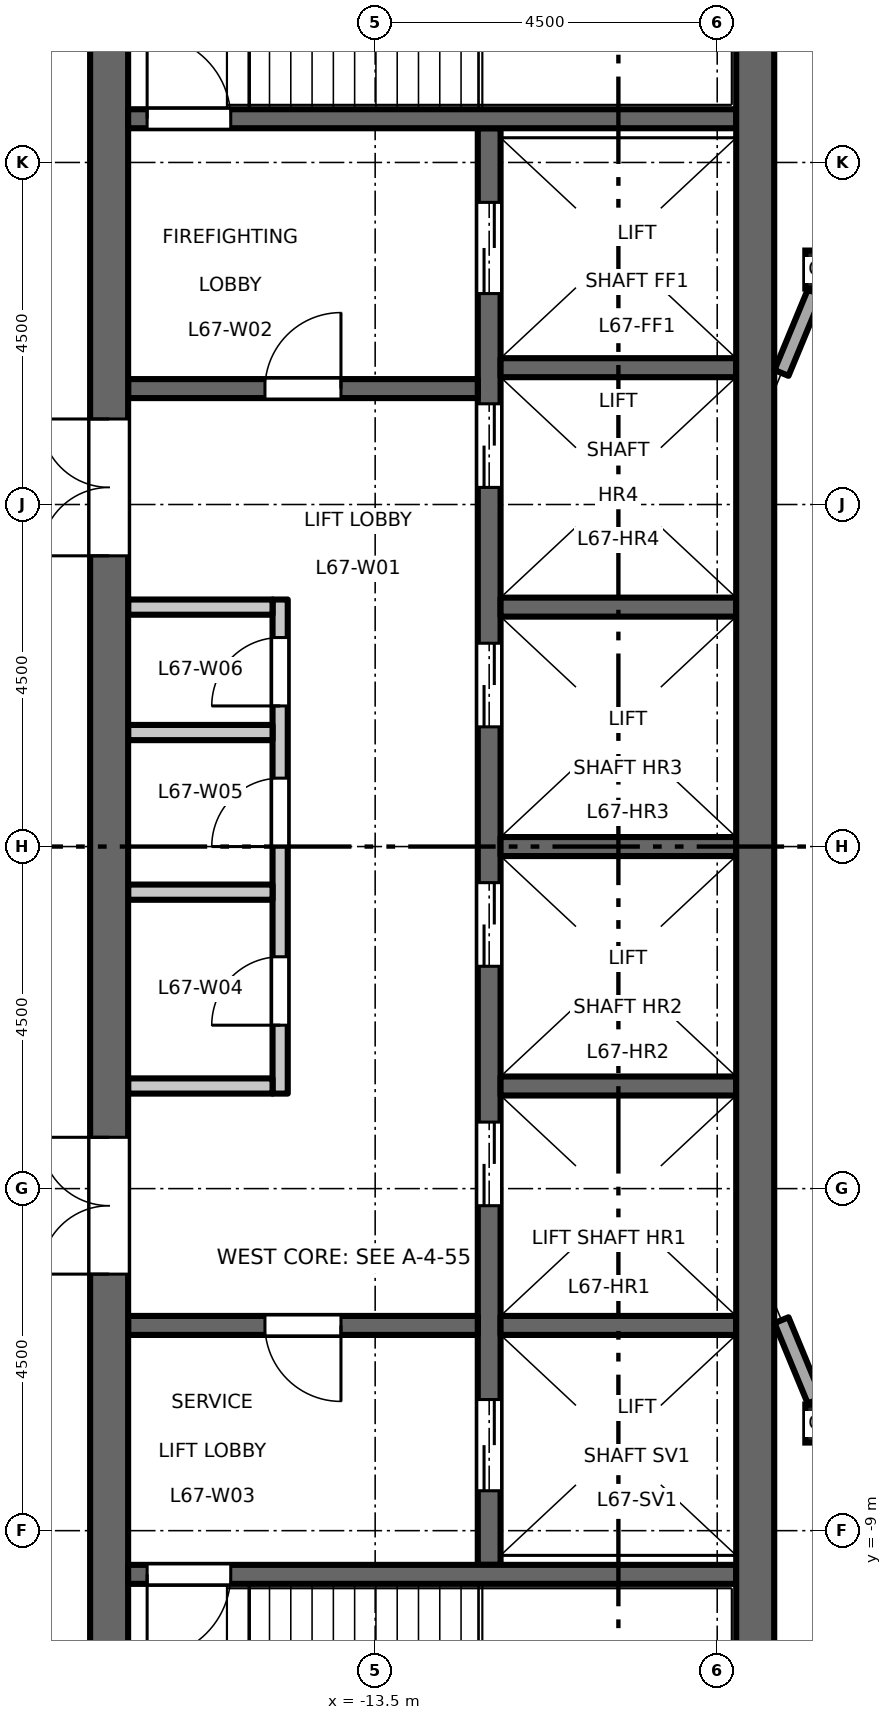
"""IFC4 building model, lengths in metres.
Left out: names, types, materials, properties, quantities, classifications, styles, units other than length and angle.
Written with IfcOpenShell. Run it as: python <this file> out.ifc"""

import sys

from ifc_helpers import new_model, si_unit, direction, frame, frame_2d, origin, origin_2d, place, context, subcontext, project, spatial, rectangle, hollow_rectangle, extrude, element, fill, save


model = new_model("IFC4")
c1 = context("Model", 3, precision=1e-05, world=origin(), true_north=direction((0.0, 1.0)))
c2 = subcontext(c1, "Body", "Model", "MODEL_VIEW")
j1 = project(units=[si_unit("LENGTHUNIT", "METRE"), si_unit("PLANEANGLEUNIT", "RADIAN")], contexts=[c1])
p1 = place(None, origin())
s1 = spatial("IfcSite", under=j1, at=p1, CompositionType="ELEMENT")
p2 = place(p1, origin())
s2 = spatial("IfcBuilding", under=s1, at=p2, CompositionType="ELEMENT")
p3 = place(p2, frame((0.0, 0.0, 312.2)))
s3 = spatial("IfcBuildingStorey", under=s2, at=p3, CompositionType="ELEMENT", Elevation=312.2)
for number, where, z_axis, x_axis in (
    (1, (-7.591, -7.591, 0.0), (0.0, 0.0, 1.0), (1.0, 0.0, 0.0)),
    (2, (-7.591, 7.591, 0.0), (0.0, 0.0, 1.0), (1.0, 0.0, 0.0)),
):
    element("IfcColumn", number, at=place(p3, frame(where, z_axis=z_axis, x_axis=x_axis)), inside=s3, PredefinedType="COLUMN", context=c2, shape_type="SweptSolid", body=[
        extrude(hollow_rectangle(XDim=0.5, YDim=0.5, WallThickness=0.025, at=origin_2d()), origin(), (0.0, 0.0, 1.0), 4.5),
    ])
p4 = place(p3, frame((-14.75, -3.25, 0.0), z_axis=(0.0, 0.0, 1.0), x_axis=(0.0, 1.0, 0.0)))
e3 = element("IfcWall", 3, at=p4, inside=s3, PredefinedType="PARTITIONING", context=c2, shape_type="SweptSolid", body=[
    extrude(rectangle(XDim=6.5, YDim=0.2, at=frame_2d((3.25, 0.0))), origin(), (0.0, 0.0, 1.0), 4.35),
])
p5 = place(p4, frame((0.9, 0.0, 0.0)))
e4 = element("IfcOpeningElement", 4, at=p5, cuts=e3, PredefinedType="OPENING", context=c2, shape_type="SweptSolid", body=[
    extrude(rectangle(XDim=0.9, YDim=2.1, at=frame_2d((0.45, 1.05))), frame((0.0, 0.11, 0.0), z_axis=(0.0, -1.0, 0.0), x_axis=(1.0, 0.0, 0.0)), (0.0, 0.0, 1.0), 0.22),
])
p6 = place(p4, frame((3.25, 0.0, 0.0)))
e5 = element("IfcOpeningElement", 5, at=p6, cuts=e3, PredefinedType="OPENING", context=c2, shape_type="SweptSolid", body=[
    extrude(rectangle(XDim=0.9, YDim=2.1, at=frame_2d((0.45, 1.05))), frame((0.0, 0.11, 0.0), z_axis=(0.0, -1.0, 0.0), x_axis=(1.0, 0.0, 0.0)), (0.0, 0.0, 1.0), 0.22),
])
p7 = place(p4, frame((5.1, 0.0, 0.0)))
e6 = element("IfcOpeningElement", 6, at=p7, cuts=e3, PredefinedType="OPENING", context=c2, shape_type="SweptSolid", body=[
    extrude(rectangle(XDim=0.9, YDim=2.1, at=frame_2d((0.45, 1.05))), frame((0.0, 0.11, 0.0), z_axis=(0.0, -1.0, 0.0), x_axis=(1.0, 0.0, 0.0)), (0.0, 0.0, 1.0), 0.22),
])
for number, where, z_axis, x_axis in (
    (7, (-14.85, 3.15, 0.0), (0.0, 0.0, 1.0), (-1.0, 0.0, 0.0)),
    (8, (-14.85, -3.15, 0.0), (0.0, 0.0, 1.0), (-1.0, 0.0, 0.0)),
    (9, (-14.85, -0.6, 0.0), (0.0, 0.0, 1.0), (-1.0, 0.0, 0.0)),
    (10, (-14.85, 1.5, 0.0), (0.0, 0.0, 1.0), (-1.0, 0.0, 0.0)),
):
    element("IfcWall", number, at=place(p3, frame(where, z_axis=z_axis, x_axis=x_axis)), inside=s3, PredefinedType="PARTITIONING", context=c2, shape_type="SweptSolid", body=[
        extrude(rectangle(XDim=1.9, YDim=0.2, at=frame_2d((0.95, 0.0))), origin(), (0.0, 0.0, 1.0), 4.35),
    ])
p8 = place(p3, frame((-12.0, -9.45, 0.0), z_axis=(0.0, 0.0, 1.0), x_axis=(0.0, 1.0, 0.0)))
e11 = element("IfcWall", 11, at=p8, inside=s3, PredefinedType="SHEAR", context=c2, shape_type="SweptSolid", body=[
    extrude(rectangle(XDim=18.9, YDim=0.3, at=frame_2d((9.45, 0.0))), origin(), (0.0, 0.0, 1.0), 4.35),
])
p9 = place(p8, frame((4.725, 0.0, 0.0)))
e12 = element("IfcOpeningElement", 12, at=p9, cuts=e11, PredefinedType="OPENING", context=c2, shape_type="SweptSolid", body=[
    extrude(rectangle(XDim=1.1, YDim=2.1, at=frame_2d((0.55, 1.05))), frame((0.0, 0.16, 0.0), z_axis=(0.0, -1.0, 0.0), x_axis=(1.0, 0.0, 0.0)), (0.0, 0.0, 1.0), 0.32),
])
p10 = place(p8, frame((7.875, 0.0, 0.0)))
e13 = element("IfcOpeningElement", 13, at=p10, cuts=e11, PredefinedType="OPENING", context=c2, shape_type="SweptSolid", body=[
    extrude(rectangle(XDim=1.1, YDim=2.1, at=frame_2d((0.55, 1.05))), frame((0.0, 0.16, 0.0), z_axis=(0.0, -1.0, 0.0), x_axis=(1.0, 0.0, 0.0)), (0.0, 0.0, 1.0), 0.32),
])
p11 = place(p8, frame((11.025, 0.0, 0.0)))
e14 = element("IfcOpeningElement", 14, at=p11, cuts=e11, PredefinedType="OPENING", context=c2, shape_type="SweptSolid", body=[
    extrude(rectangle(XDim=1.1, YDim=2.1, at=frame_2d((0.55, 1.05))), frame((0.0, 0.16, 0.0), z_axis=(0.0, -1.0, 0.0), x_axis=(1.0, 0.0, 0.0)), (0.0, 0.0, 1.0), 0.32),
])
p12 = place(p8, frame((14.175, 0.0, 0.0)))
e15 = element("IfcOpeningElement", 15, at=p12, cuts=e11, PredefinedType="OPENING", context=c2, shape_type="SweptSolid", body=[
    extrude(rectangle(XDim=1.1, YDim=2.1, at=frame_2d((0.55, 1.05))), frame((0.0, 0.16, 0.0), z_axis=(0.0, -1.0, 0.0), x_axis=(1.0, 0.0, 0.0)), (0.0, 0.0, 1.0), 0.32),
])
p13 = place(p8, frame((16.725, 0.0, 0.0)))
e16 = element("IfcOpeningElement", 16, at=p13, cuts=e11, PredefinedType="OPENING", context=c2, shape_type="SweptSolid", body=[
    extrude(rectangle(XDim=1.2, YDim=2.1, at=frame_2d((0.6, 1.05))), frame((0.0, 0.16, 0.0), z_axis=(0.0, -1.0, 0.0), x_axis=(1.0, 0.0, 0.0)), (0.0, 0.0, 1.0), 0.32),
])
p14 = place(p8, frame((0.975, 0.0, 0.0)))
e17 = element("IfcOpeningElement", 17, at=p14, cuts=e11, PredefinedType="OPENING", context=c2, shape_type="SweptSolid", body=[
    extrude(rectangle(XDim=1.2, YDim=2.1, at=frame_2d((0.6, 1.05))), frame((0.0, 0.16, 0.0), z_axis=(0.0, -1.0, 0.0), x_axis=(1.0, 0.0, 0.0)), (0.0, 0.0, 1.0), 0.32),
])
p15 = place(p3, frame((-12.15, 6.025, 0.0), z_axis=(0.0, 0.0, 1.0), x_axis=(-1.0, 0.0, 0.0)))
e18 = element("IfcWall", 18, at=p15, inside=s3, PredefinedType="SHEAR", context=c2, shape_type="SweptSolid", body=[
    extrude(rectangle(XDim=4.6, YDim=0.25, at=frame_2d((2.3, 0.0))), origin(), (0.0, 0.0, 1.0), 4.35),
])
p16 = place(p15, frame((1.8, 0.0, 0.0)))
e19 = element("IfcOpeningElement", 19, at=p16, cuts=e18, PredefinedType="OPENING", context=c2, shape_type="SweptSolid", body=[
    extrude(rectangle(XDim=1.0, YDim=2.1, at=frame_2d((0.5, 1.05))), frame((0.0, 0.135, 0.0), z_axis=(0.0, -1.0, 0.0), x_axis=(1.0, 0.0, 0.0)), (0.0, 0.0, 1.0), 0.27),
])
p17 = place(p3, frame((-12.15, -6.3, 0.0), z_axis=(0.0, 0.0, 1.0), x_axis=(-1.0, 0.0, 0.0)))
e20 = element("IfcWall", 20, at=p17, inside=s3, PredefinedType="SHEAR", context=c2, shape_type="SweptSolid", body=[
    extrude(rectangle(XDim=4.6, YDim=0.25, at=frame_2d((2.3, 0.0))), origin(), (0.0, 0.0, 1.0), 4.35),
])
p18 = place(p17, frame((1.8, 0.0, 0.0)))
e21 = element("IfcOpeningElement", 21, at=p18, cuts=e20, PredefinedType="OPENING", context=c2, shape_type="SweptSolid", body=[
    extrude(rectangle(XDim=1.0, YDim=2.1, at=frame_2d((0.5, 1.05))), frame((0.0, 0.135, 0.0), z_axis=(0.0, -1.0, 0.0), x_axis=(1.0, 0.0, 0.0)), (0.0, 0.0, 1.0), 0.27),
])
p19 = place(p3, frame((-17.0, -13.0, 0.0), z_axis=(0.0, 0.0, 1.0), x_axis=(0.0, 1.0, 0.0)))
e22 = element("IfcWall", 22, at=p19, inside=s3, PredefinedType="SHEAR", context=c2, shape_type="SweptSolid", body=[
    extrude(rectangle(XDim=26.0, YDim=0.5, at=frame_2d((13.0, 0.0))), origin(), (0.0, 0.0, 1.0), 4.35),
])
p20 = place(p19, frame((16.825, 0.0, 0.0)))
e23 = element("IfcOpeningElement", 23, at=p20, cuts=e22, PredefinedType="OPENING", context=c2, shape_type="SweptSolid", body=[
    extrude(rectangle(XDim=1.8, YDim=2.1, at=frame_2d((0.9, 1.05))), frame((0.0, 0.26, 0.0), z_axis=(0.0, -1.0, 0.0), x_axis=(1.0, 0.0, 0.0)), (0.0, 0.0, 1.0), 0.52),
])
p21 = place(p19, frame((7.375, 0.0, 0.0)))
e24 = element("IfcOpeningElement", 24, at=p21, cuts=e22, PredefinedType="OPENING", context=c2, shape_type="SweptSolid", body=[
    extrude(rectangle(XDim=1.8, YDim=2.1, at=frame_2d((0.9, 1.05))), frame((0.0, 0.26, 0.0), z_axis=(0.0, -1.0, 0.0), x_axis=(1.0, 0.0, 0.0)), (0.0, 0.0, 1.0), 0.52),
])
for number, where, z_axis, x_axis in (
    (25, (-8.75, 0.0, 0.0), (0.0, 0.0, 1.0), (-1.0, 0.0, 0.0)),
    (26, (-8.75, 3.15, 0.0), (0.0, 0.0, 1.0), (-1.0, 0.0, 0.0)),
    (27, (-8.75, 6.3, 0.0), (0.0, 0.0, 1.0), (-1.0, 0.0, 0.0)),
    (28, (-8.75, -3.15, 0.0), (0.0, 0.0, 1.0), (-1.0, 0.0, 0.0)),
    (29, (-8.75, -6.3, 0.0), (0.0, 0.0, 1.0), (-1.0, 0.0, 0.0)),
):
    element("IfcWall", number, at=place(p3, frame(where, z_axis=z_axis, x_axis=x_axis)), inside=s3, PredefinedType="SHEAR", context=c2, shape_type="SweptSolid", body=[
        extrude(rectangle(XDim=3.1, YDim=0.25, at=frame_2d((1.55, 0.0))), origin(), (0.0, 0.0, 1.0), 4.35),
    ])
p22 = place(p3, frame((-8.75, 9.575, 0.0), z_axis=(0.0, 0.0, 1.0), x_axis=(-1.0, 0.0, 0.0)))
e30 = element("IfcWall", 30, at=p22, inside=s3, PredefinedType="SHEAR", context=c2, shape_type="SweptSolid", body=[
    extrude(rectangle(XDim=8.0, YDim=0.25, at=frame_2d((4.0, 0.0))), origin(), (0.0, 0.0, 1.0), 4.35),
])
p23 = place(p22, frame((6.65, 0.0, 0.0)))
e31 = element("IfcOpeningElement", 31, at=p23, cuts=e30, PredefinedType="OPENING", context=c2, shape_type="SweptSolid", body=[
    extrude(rectangle(XDim=1.1, YDim=2.1, at=frame_2d((0.55, 1.05))), frame((0.0, 0.135, 0.0), z_axis=(0.0, -1.0, 0.0), x_axis=(1.0, 0.0, 0.0)), (0.0, 0.0, 1.0), 0.27),
])
p24 = place(p3, frame((-8.75, -9.575, 0.0), z_axis=(0.0, 0.0, 1.0), x_axis=(-1.0, 0.0, 0.0)))
e32 = element("IfcWall", 32, at=p24, inside=s3, PredefinedType="SHEAR", context=c2, shape_type="SweptSolid", body=[
    extrude(rectangle(XDim=8.0, YDim=0.25, at=frame_2d((4.0, 0.0))), origin(), (0.0, 0.0, 1.0), 4.35),
])
p25 = place(p24, frame((6.65, 0.0, 0.0)))
e33 = element("IfcOpeningElement", 33, at=p25, cuts=e32, PredefinedType="OPENING", context=c2, shape_type="SweptSolid", body=[
    extrude(rectangle(XDim=1.1, YDim=2.1, at=frame_2d((0.55, 1.05))), frame((0.0, 0.135, 0.0), z_axis=(0.0, -1.0, 0.0), x_axis=(1.0, 0.0, 0.0)), (0.0, 0.0, 1.0), 0.27),
])
p26 = place(p3, frame((-8.5, -13.0, 0.0), z_axis=(0.0, 0.0, 1.0), x_axis=(0.0, 1.0, 0.0)))
e34 = element("IfcWall", 34, at=p26, inside=s3, PredefinedType="SHEAR", context=c2, shape_type="SweptSolid", body=[
    extrude(rectangle(XDim=26.0, YDim=0.5, at=frame_2d((13.0, 0.0))), origin(), (0.0, 0.0, 1.0), 4.35),
])
for number, where, z_axis, x_axis in (
    (35, (-7.716, 7.289, 0.0), (0.0, 0.0, 1.0), (-0.383, -0.924, 0.0)),
    (36, (-8.154, -6.231, 0.0), (0.0, 0.0, 1.0), (0.383, -0.924, 0.0)),
):
    element("IfcWall", number, at=place(p3, frame(where, z_axis=z_axis, x_axis=x_axis)), inside=s3, PredefinedType="STANDARD", context=c2, shape_type="SweptSolid", body=[
        extrude(rectangle(XDim=1.146, YDim=0.2, at=frame_2d((0.573, 0.0))), origin(), (0.0, 0.0, 1.0), 4.01),
    ])
p27 = place(p16, origin())
e37 = element("IfcDoor", 37, at=p27, inside=s3, OperationType="SINGLE_SWING_LEFT", PredefinedType="DOOR", context=c2, shape_type="SweptSolid", body=[
    extrude(rectangle(XDim=1.0, YDim=2.1, at=frame_2d((0.5, 1.05))), frame((0.0, 0.025, 0.0), z_axis=(0.0, -1.0, 0.0), x_axis=(1.0, 0.0, 0.0)), (0.0, 0.0, 1.0), 0.05),
])
fill(e19, e37)
p28 = place(p18, origin())
e38 = element("IfcDoor", 38, at=p28, inside=s3, OperationType="SINGLE_SWING_RIGHT", PredefinedType="DOOR", context=c2, shape_type="SweptSolid", body=[
    extrude(rectangle(XDim=1.0, YDim=2.1, at=frame_2d((0.5, 1.05))), frame((0.0, 0.025, 0.0), z_axis=(0.0, -1.0, 0.0), x_axis=(1.0, 0.0, 0.0)), (0.0, 0.0, 1.0), 0.05),
])
fill(e21, e38)
p29 = place(p23, origin())
e39 = element("IfcDoor", 39, at=p29, inside=s3, OperationType="SINGLE_SWING_RIGHT", PredefinedType="DOOR", context=c2, shape_type="SweptSolid", body=[
    extrude(rectangle(XDim=1.1, YDim=2.1, at=frame_2d((0.55, 1.05))), frame((0.0, 0.025, 0.0), z_axis=(0.0, -1.0, 0.0), x_axis=(1.0, 0.0, 0.0)), (0.0, 0.0, 1.0), 0.05),
])
fill(e31, e39)
p30 = place(p25, origin())
e40 = element("IfcDoor", 40, at=p30, inside=s3, OperationType="SINGLE_SWING_LEFT", PredefinedType="DOOR", context=c2, shape_type="SweptSolid", body=[
    extrude(rectangle(XDim=1.1, YDim=2.1, at=frame_2d((0.55, 1.05))), frame((0.0, 0.025, 0.0), z_axis=(0.0, -1.0, 0.0), x_axis=(1.0, 0.0, 0.0)), (0.0, 0.0, 1.0), 0.05),
])
fill(e33, e40)
p31 = place(p20, origin())
e41 = element("IfcDoor", 41, at=p31, inside=s3, OperationType="DOUBLE_DOOR_DOUBLE_SWING", PredefinedType="DOOR", context=c2, shape_type="SweptSolid", body=[
    extrude(rectangle(XDim=1.8, YDim=2.1, at=frame_2d((0.9, 1.05))), frame((0.0, 0.025, 0.0), z_axis=(0.0, -1.0, 0.0), x_axis=(1.0, 0.0, 0.0)), (0.0, 0.0, 1.0), 0.05),
])
fill(e23, e41)
p32 = place(p21, origin())
e42 = element("IfcDoor", 42, at=p32, inside=s3, OperationType="DOUBLE_DOOR_DOUBLE_SWING", PredefinedType="DOOR", context=c2, shape_type="SweptSolid", body=[
    extrude(rectangle(XDim=1.8, YDim=2.1, at=frame_2d((0.9, 1.05))), frame((0.0, 0.025, 0.0), z_axis=(0.0, -1.0, 0.0), x_axis=(1.0, 0.0, 0.0)), (0.0, 0.0, 1.0), 0.05),
])
fill(e24, e42)
p33 = place(p9, origin())
e43 = element("IfcDoor", 43, at=p33, inside=s3, OperationType="DOUBLE_DOOR_SLIDING", PredefinedType="DOOR", context=c2, shape_type="SweptSolid", body=[
    extrude(rectangle(XDim=1.1, YDim=2.1, at=frame_2d((0.55, 1.05))), frame((0.0, 0.025, 0.0), z_axis=(0.0, -1.0, 0.0), x_axis=(1.0, 0.0, 0.0)), (0.0, 0.0, 1.0), 0.05),
])
fill(e12, e43)
p34 = place(p10, origin())
e44 = element("IfcDoor", 44, at=p34, inside=s3, OperationType="DOUBLE_DOOR_SLIDING", PredefinedType="DOOR", context=c2, shape_type="SweptSolid", body=[
    extrude(rectangle(XDim=1.1, YDim=2.1, at=frame_2d((0.55, 1.05))), frame((0.0, 0.025, 0.0), z_axis=(0.0, -1.0, 0.0), x_axis=(1.0, 0.0, 0.0)), (0.0, 0.0, 1.0), 0.05),
])
fill(e13, e44)
p35 = place(p11, origin())
e45 = element("IfcDoor", 45, at=p35, inside=s3, OperationType="DOUBLE_DOOR_SLIDING", PredefinedType="DOOR", context=c2, shape_type="SweptSolid", body=[
    extrude(rectangle(XDim=1.1, YDim=2.1, at=frame_2d((0.55, 1.05))), frame((0.0, 0.025, 0.0), z_axis=(0.0, -1.0, 0.0), x_axis=(1.0, 0.0, 0.0)), (0.0, 0.0, 1.0), 0.05),
])
fill(e14, e45)
p36 = place(p12, origin())
e46 = element("IfcDoor", 46, at=p36, inside=s3, OperationType="DOUBLE_DOOR_SLIDING", PredefinedType="DOOR", context=c2, shape_type="SweptSolid", body=[
    extrude(rectangle(XDim=1.1, YDim=2.1, at=frame_2d((0.55, 1.05))), frame((0.0, 0.025, 0.0), z_axis=(0.0, -1.0, 0.0), x_axis=(1.0, 0.0, 0.0)), (0.0, 0.0, 1.0), 0.05),
])
fill(e15, e46)
p37 = place(p13, origin())
e47 = element("IfcDoor", 47, at=p37, inside=s3, OperationType="DOUBLE_DOOR_SLIDING", PredefinedType="DOOR", context=c2, shape_type="SweptSolid", body=[
    extrude(rectangle(XDim=1.2, YDim=2.1, at=frame_2d((0.6, 1.05))), frame((0.0, 0.025, 0.0), z_axis=(0.0, -1.0, 0.0), x_axis=(1.0, 0.0, 0.0)), (0.0, 0.0, 1.0), 0.05),
])
fill(e16, e47)
p38 = place(p14, origin())
e48 = element("IfcDoor", 48, at=p38, inside=s3, OperationType="DOUBLE_DOOR_SLIDING", PredefinedType="DOOR", context=c2, shape_type="SweptSolid", body=[
    extrude(rectangle(XDim=1.2, YDim=2.1, at=frame_2d((0.6, 1.05))), frame((0.0, 0.025, 0.0), z_axis=(0.0, -1.0, 0.0), x_axis=(1.0, 0.0, 0.0)), (0.0, 0.0, 1.0), 0.05),
])
fill(e17, e48)
p39 = place(p5, origin())
e49 = element("IfcDoor", 49, at=p39, inside=s3, OperationType="SINGLE_SWING_RIGHT", PredefinedType="DOOR", context=c2, shape_type="SweptSolid", body=[
    extrude(rectangle(XDim=0.9, YDim=2.1, at=frame_2d((0.45, 1.05))), frame((0.0, 0.025, 0.0), z_axis=(0.0, -1.0, 0.0), x_axis=(1.0, 0.0, 0.0)), (0.0, 0.0, 1.0), 0.05),
])
fill(e4, e49)
p40 = place(p6, origin())
e50 = element("IfcDoor", 50, at=p40, inside=s3, OperationType="SINGLE_SWING_RIGHT", PredefinedType="DOOR", context=c2, shape_type="SweptSolid", body=[
    extrude(rectangle(XDim=0.9, YDim=2.1, at=frame_2d((0.45, 1.05))), frame((0.0, 0.025, 0.0), z_axis=(0.0, -1.0, 0.0), x_axis=(1.0, 0.0, 0.0)), (0.0, 0.0, 1.0), 0.05),
])
fill(e5, e50)
p41 = place(p7, origin())
e51 = element("IfcDoor", 51, at=p41, inside=s3, OperationType="SINGLE_SWING_RIGHT", PredefinedType="DOOR", context=c2, shape_type="SweptSolid", body=[
    extrude(rectangle(XDim=0.9, YDim=2.1, at=frame_2d((0.45, 1.05))), frame((0.0, 0.025, 0.0), z_axis=(0.0, -1.0, 0.0), x_axis=(1.0, 0.0, 0.0)), (0.0, 0.0, 1.0), 0.05),
])
fill(e6, e51)
save(model, sys.argv[1])
